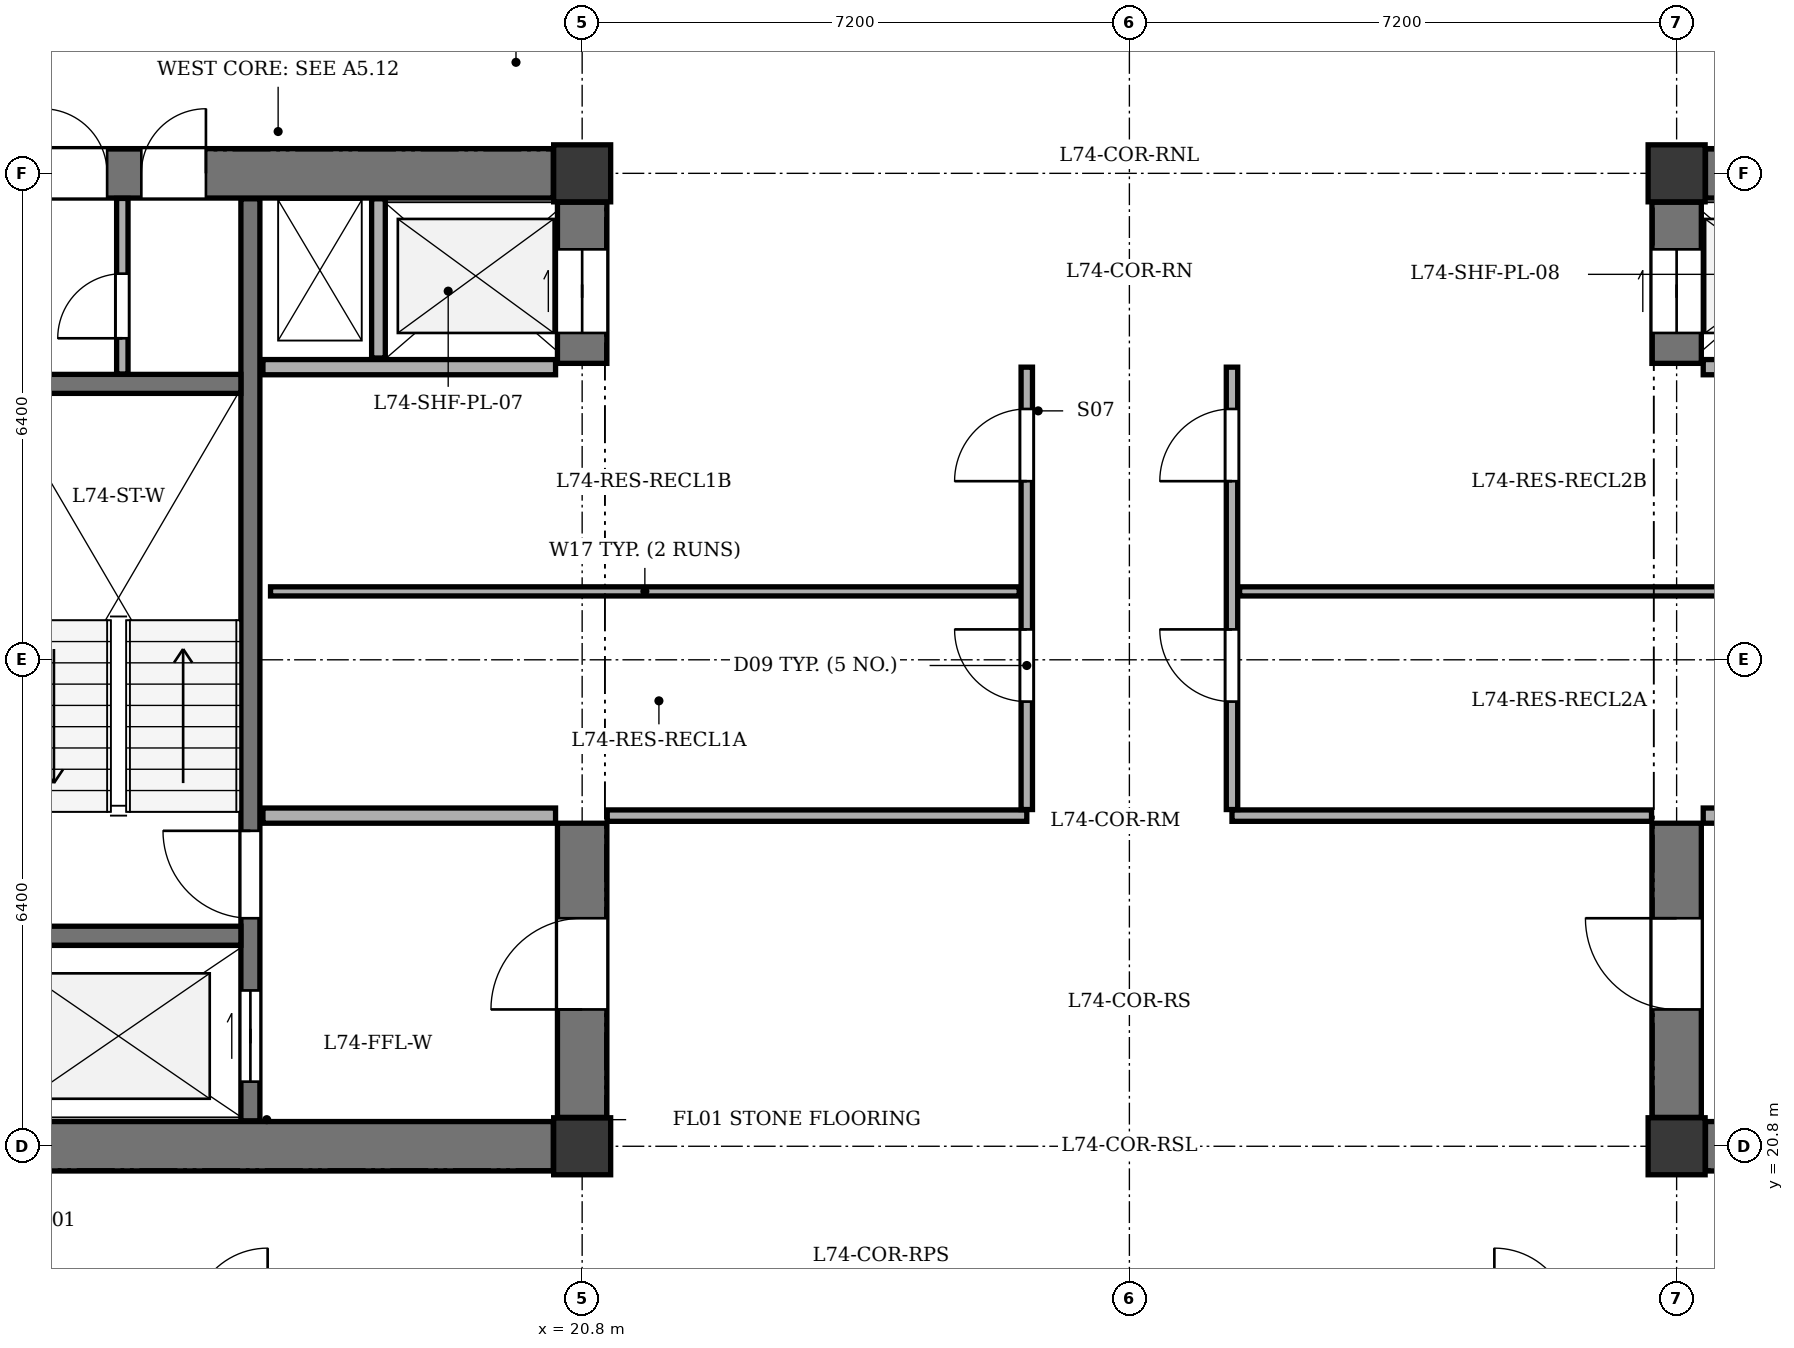
"""IFC4 building model, lengths in metres.
Left out: names, types, materials, properties, quantities, classifications, styles, units other than length and angle.
Written with IfcOpenShell. Run it as: python <this file> out.ifc"""

import sys

from ifc_helpers import new_model, si_unit, direction, frame, frame_2d, origin, origin_2d, place, context, subcontext, project, spatial, rectangle, extrude, element, fill, save


model = new_model("IFC4")
c1 = context("Model", 3, precision=1e-05, world=origin(), true_north=direction((0.0, 1.0)))
c2 = subcontext(c1, "Body", "Model", "MODEL_VIEW")
j1 = project(units=[si_unit("LENGTHUNIT", "METRE"), si_unit("PLANEANGLEUNIT", "RADIAN")], contexts=[c1])
p1 = place(None, origin())
s1 = spatial("IfcSite", under=j1, at=p1, CompositionType="ELEMENT")
p2 = place(p1, origin())
s2 = spatial("IfcBuilding", under=s1, at=p2, CompositionType="ELEMENT")
p3 = place(p2, frame((0.0, 0.0, 278.9)))
s3 = spatial("IfcBuildingStorey", under=s2, at=p3, CompositionType="ELEMENT", Elevation=278.9)
for number, where, z_axis, x_axis in (
    (1, (20.8, 20.8, 0.0), (0.0, 0.0, 1.0), (1.0, 0.0, 0.0)),
    (2, (20.8, 33.6, 0.0), (0.0, 0.0, 1.0), (1.0, 0.0, 0.0)),
    (3, (35.2, 20.8, 0.0), (0.0, 0.0, 1.0), (1.0, 0.0, 0.0)),
    (4, (35.2, 33.6, 0.0), (0.0, 0.0, 1.0), (1.0, 0.0, 0.0)),
):
    element("IfcColumn", number, at=place(p3, frame(where, z_axis=z_axis, x_axis=x_axis)), inside=s3, PredefinedType="COLUMN", context=c2, shape_type="SweptSolid", body=[
        extrude(rectangle(XDim=0.75, YDim=0.75, at=origin_2d()), origin(), (0.0, 0.0, 1.0), 3.4),
    ])
p4 = place(p3, frame((13.18, 20.8, 0.0), z_axis=(0.0, 0.0, 1.0), x_axis=(1.0, 0.0, 0.0)))
e5 = element("IfcWall", 5, at=p4, inside=s3, PredefinedType="SHEAR", context=c2, shape_type="SweptSolid", body=[
    extrude(rectangle(XDim=7.24, YDim=0.65, at=frame_2d((3.62, 0.0))), origin(), (0.0, 0.0, 1.0), 2.95),
])
p5 = place(p3, frame((13.18, 33.6, 0.0), z_axis=(0.0, 0.0, 1.0), x_axis=(1.0, 0.0, 0.0)))
e6 = element("IfcWall", 6, at=p5, inside=s3, PredefinedType="SHEAR", context=c2, shape_type="SweptSolid", body=[
    extrude(rectangle(XDim=7.24, YDim=0.65, at=frame_2d((3.62, 0.0))), origin(), (0.0, 0.0, 1.0), 2.95),
])
p6 = place(p5, frame((0.52, 0.0, 0.0)))
e7 = element("IfcOpeningElement", 7, at=p6, cuts=e6, PredefinedType="OPENING", context=c2, shape_type="SweptSolid", body=[
    extrude(rectangle(XDim=0.85, YDim=2.02, at=frame_2d((0.425, 1.01))), frame((0.0, 0.335, 0.0), z_axis=(0.0, -1.0, 0.0), x_axis=(1.0, 0.0, 0.0)), (0.0, 0.0, 1.0), 0.67),
])
p7 = place(p5, frame((1.82, 0.0, 0.0)))
e8 = element("IfcOpeningElement", 8, at=p7, cuts=e6, PredefinedType="OPENING", context=c2, shape_type="SweptSolid", body=[
    extrude(rectangle(XDim=0.85, YDim=2.02, at=frame_2d((0.425, 1.01))), frame((0.0, 0.335, 0.0), z_axis=(0.0, -1.0, 0.0), x_axis=(1.0, 0.0, 0.0)), (0.0, 0.0, 1.0), 0.67),
])
p8 = place(p3, frame((20.8, 21.18, 0.0), z_axis=(0.0, 0.0, 1.0), x_axis=(0.0, 1.0, 0.0)))
e9 = element("IfcWall", 9, at=p8, inside=s3, PredefinedType="SHEAR", context=c2, shape_type="SweptSolid", body=[
    extrude(rectangle(XDim=3.87, YDim=0.65, at=frame_2d((1.935, 0.0))), origin(), (0.0, 0.0, 1.0), 2.95),
])
p9 = place(p8, frame((1.42, 0.0, 0.0)))
e10 = element("IfcOpeningElement", 10, at=p9, cuts=e9, PredefinedType="OPENING", context=c2, shape_type="SweptSolid", body=[
    extrude(rectangle(XDim=1.2, YDim=2.15, at=frame_2d((0.6, 1.075))), frame((0.0, 0.335, 0.0), z_axis=(0.0, -1.0, 0.0), x_axis=(1.0, 0.0, 0.0)), (0.0, 0.0, 1.0), 0.67),
])
p10 = place(p3, frame((20.8, 31.1, 0.0), z_axis=(0.0, 0.0, 1.0), x_axis=(0.0, 1.0, 0.0)))
e11 = element("IfcWall", 11, at=p10, inside=s3, PredefinedType="SHEAR", context=c2, shape_type="SweptSolid", body=[
    extrude(rectangle(XDim=2.12, YDim=0.65, at=frame_2d((1.06, 0.0))), origin(), (0.0, 0.0, 1.0), 2.95),
])
p11 = place(p10, frame((0.4, 0.0, 0.0)))
e12 = element("IfcOpeningElement", 12, at=p11, cuts=e11, PredefinedType="OPENING", context=c2, shape_type="SweptSolid", body=[
    extrude(rectangle(XDim=1.1, YDim=2.1, at=frame_2d((0.55, 1.05))), frame((0.0, 0.335, 0.0), z_axis=(0.0, -1.0, 0.0), x_axis=(1.0, 0.0, 0.0)), (0.0, 0.0, 1.0), 0.67),
])
p12 = place(p3, frame((16.435, 21.135, 0.0), z_axis=(0.0, 0.0, 1.0), x_axis=(0.0, 1.0, 0.0)))
e13 = element("IfcWall", 13, at=p12, inside=s3, PredefinedType="SHEAR", context=c2, shape_type="SweptSolid", body=[
    extrude(rectangle(XDim=12.13, YDim=0.25, at=frame_2d((6.065, 0.0))), origin(), (0.0, 0.0, 1.0), 2.95),
])
p13 = place(p12, frame((0.515, 0.0, 0.0)))
e14 = element("IfcOpeningElement", 14, at=p13, cuts=e13, PredefinedType="OPENING", context=c2, shape_type="SweptSolid", body=[
    extrude(rectangle(XDim=1.2, YDim=2.15, at=frame_2d((0.6, 1.075))), frame((0.0, 0.135, 0.0), z_axis=(0.0, -1.0, 0.0), x_axis=(1.0, 0.0, 0.0)), (0.0, 0.0, 1.0), 0.27),
])
p14 = place(p12, frame((2.665, 0.0, 0.0)))
e15 = element("IfcOpeningElement", 15, at=p14, cuts=e13, PredefinedType="OPENING", context=c2, shape_type="SweptSolid", body=[
    extrude(rectangle(XDim=1.15, YDim=2.15, at=frame_2d((0.575, 1.075))), frame((0.0, 0.135, 0.0), z_axis=(0.0, -1.0, 0.0), x_axis=(1.0, 0.0, 0.0)), (0.0, 0.0, 1.0), 0.27),
])
for number, where, z_axis, x_axis in (
    (16, (13.135, 23.57, 0.0), (0.0, 0.0, 1.0), (1.0, 0.0, 0.0)),
    (17, (13.135, 30.83, 0.0), (0.0, 0.0, 1.0), (1.0, 0.0, 0.0)),
):
    element("IfcWall", number, at=place(p3, frame(where, z_axis=z_axis, x_axis=x_axis)), inside=s3, PredefinedType="SHEAR", context=c2, shape_type="SweptSolid", body=[
        extrude(rectangle(XDim=3.175, YDim=0.25, at=frame_2d((1.587, 0.0))), origin(), (0.0, 0.0, 1.0), 2.95),
    ])
for number, where, z_axis, x_axis in (
    (18, (16.6, 25.15, 0.0), (0.0, 0.0, 1.0), (1.0, 0.0, 0.0)),
    (19, (16.6, 31.05, 0.0), (0.0, 0.0, 1.0), (1.0, 0.0, 0.0)),
):
    element("IfcWall", number, at=place(p3, frame(where, z_axis=z_axis, x_axis=x_axis)), inside=s3, PredefinedType="SOLIDWALL", context=c2, shape_type="SweptSolid", body=[
        extrude(rectangle(XDim=3.85, YDim=0.2, at=frame_2d((1.925, 0.0))), origin(), (0.0, 0.0, 1.0), 2.95),
    ])
p15 = place(p3, frame((18.12, 31.17, 0.0), z_axis=(0.0, 0.0, 1.0), x_axis=(0.0, 1.0, 0.0)))
e20 = element("IfcWall", 20, at=p15, inside=s3, PredefinedType="PARTITIONING", context=c2, shape_type="SweptSolid", body=[
    extrude(rectangle(XDim=2.095, YDim=0.18, at=frame_2d((1.047, 0.0))), origin(), (0.0, 0.0, 1.0), 2.95),
])
p16 = place(p3, frame((35.58, 20.8, 0.0), z_axis=(0.0, 0.0, 1.0), x_axis=(1.0, 0.0, 0.0)))
e21 = element("IfcWall", 21, at=p16, inside=s3, PredefinedType="SHEAR", context=c2, shape_type="SweptSolid", body=[
    extrude(rectangle(XDim=7.24, YDim=0.65, at=frame_2d((3.62, 0.0))), origin(), (0.0, 0.0, 1.0), 2.95),
])
p17 = place(p3, frame((35.58, 33.6, 0.0), z_axis=(0.0, 0.0, 1.0), x_axis=(1.0, 0.0, 0.0)))
e22 = element("IfcWall", 22, at=p17, inside=s3, PredefinedType="SHEAR", context=c2, shape_type="SweptSolid", body=[
    extrude(rectangle(XDim=7.24, YDim=0.65, at=frame_2d((3.62, 0.0))), origin(), (0.0, 0.0, 1.0), 2.95),
])
p18 = place(p17, frame((4.82, 0.0, 0.0)))
e23 = element("IfcOpeningElement", 23, at=p18, cuts=e22, PredefinedType="OPENING", context=c2, shape_type="SweptSolid", body=[
    extrude(rectangle(XDim=1.3, YDim=2.15, at=frame_2d((0.65, 1.075))), frame((0.0, 0.335, 0.0), z_axis=(0.0, -1.0, 0.0), x_axis=(1.0, 0.0, 0.0)), (0.0, 0.0, 1.0), 0.67),
])
p19 = place(p17, frame((2.62, 0.0, 0.0)))
e24 = element("IfcOpeningElement", 24, at=p19, cuts=e22, PredefinedType="OPENING", context=c2, shape_type="SweptSolid", body=[
    extrude(rectangle(XDim=0.85, YDim=2.02, at=frame_2d((0.425, 1.01))), frame((0.0, 0.335, 0.0), z_axis=(0.0, -1.0, 0.0), x_axis=(1.0, 0.0, 0.0)), (0.0, 0.0, 1.0), 0.67),
])
p20 = place(p3, frame((35.2, 21.18, 0.0), z_axis=(0.0, 0.0, 1.0), x_axis=(0.0, 1.0, 0.0)))
e25 = element("IfcWall", 25, at=p20, inside=s3, PredefinedType="SHEAR", context=c2, shape_type="SweptSolid", body=[
    extrude(rectangle(XDim=3.87, YDim=0.65, at=frame_2d((1.935, 0.0))), origin(), (0.0, 0.0, 1.0), 2.95),
])
p21 = place(p20, frame((1.42, 0.0, 0.0)))
e26 = element("IfcOpeningElement", 26, at=p21, cuts=e25, PredefinedType="OPENING", context=c2, shape_type="SweptSolid", body=[
    extrude(rectangle(XDim=1.2, YDim=2.15, at=frame_2d((0.6, 1.075))), frame((0.0, 0.335, 0.0), z_axis=(0.0, -1.0, 0.0), x_axis=(1.0, 0.0, 0.0)), (0.0, 0.0, 1.0), 0.67),
])
p22 = place(p3, frame((35.2, 31.1, 0.0), z_axis=(0.0, 0.0, 1.0), x_axis=(0.0, 1.0, 0.0)))
e27 = element("IfcWall", 27, at=p22, inside=s3, PredefinedType="SHEAR", context=c2, shape_type="SweptSolid", body=[
    extrude(rectangle(XDim=2.12, YDim=0.65, at=frame_2d((1.06, 0.0))), origin(), (0.0, 0.0, 1.0), 2.95),
])
p23 = place(p22, frame((0.4, 0.0, 0.0)))
e28 = element("IfcOpeningElement", 28, at=p23, cuts=e27, PredefinedType="OPENING", context=c2, shape_type="SweptSolid", body=[
    extrude(rectangle(XDim=1.1, YDim=2.1, at=frame_2d((0.55, 1.05))), frame((0.0, 0.335, 0.0), z_axis=(0.0, -1.0, 0.0), x_axis=(1.0, 0.0, 0.0)), (0.0, 0.0, 1.0), 0.67),
])
p24 = place(p3, frame((35.55, 25.15, 0.0), z_axis=(0.0, 0.0, 1.0), x_axis=(1.0, 0.0, 0.0)))
e29 = element("IfcWall", 29, at=p24, inside=s3, PredefinedType="SOLIDWALL", context=c2, shape_type="SweptSolid", body=[
    extrude(rectangle(XDim=3.85, YDim=0.2, at=frame_2d((1.925, 0.0))), origin(), (0.0, 0.0, 1.0), 2.95),
])
p25 = place(p3, frame((35.55, 31.05, 0.0), z_axis=(0.0, 0.0, 1.0), x_axis=(1.0, 0.0, 0.0)))
e30 = element("IfcWall", 30, at=p25, inside=s3, PredefinedType="SOLIDWALL", context=c2, shape_type="SweptSolid", body=[
    extrude(rectangle(XDim=2.25, YDim=0.2, at=frame_2d((1.125, 0.0))), origin(), (0.0, 0.0, 1.0), 2.95),
])
p26 = place(p3, frame((14.75, 30.96, 0.0), z_axis=(0.0, 0.0, 1.0), x_axis=(0.0, 1.0, 0.0)))
e31 = element("IfcWall", 31, at=p26, inside=s3, PredefinedType="PARTITIONING", context=c2, shape_type="SweptSolid", body=[
    extrude(rectangle(XDim=2.31, YDim=0.15, at=frame_2d((1.155, 0.0))), origin(), (0.0, 0.0, 1.0), 2.95),
])
p27 = place(p26, frame((0.47, 0.0, 0.0)))
e32 = element("IfcOpeningElement", 32, at=p27, cuts=e31, PredefinedType="OPENING", context=c2, shape_type="SweptSolid", body=[
    extrude(rectangle(XDim=0.85, YDim=2.02, at=frame_2d((0.425, 1.01))), frame((0.0, 0.085, 0.0), z_axis=(0.0, -1.0, 0.0), x_axis=(1.0, 0.0, 0.0)), (0.0, 0.0, 1.0), 0.17),
])
for number, where, z_axis, x_axis in (
    (33, (21.13, 25.15, 0.0), (0.0, 0.0, 1.0), (1.0, 0.0, 0.0)),
    (34, (29.35, 25.15, 0.0), (0.0, 0.0, 1.0), (1.0, 0.0, 0.0)),
):
    element("IfcWall", number, at=place(p3, frame(where, z_axis=z_axis, x_axis=x_axis)), inside=s3, PredefinedType="PARTITIONING", context=c2, shape_type="SweptSolid", body=[
        extrude(rectangle(XDim=5.52, YDim=0.15, at=frame_2d((2.76, 0.0))), origin(), (0.0, 0.0, 1.0), 2.95),
    ])
p28 = place(p3, frame((26.65, 25.23, 0.0), z_axis=(0.0, 0.0, 1.0), x_axis=(0.0, 1.0, 0.0)))
e35 = element("IfcWall", 35, at=p28, inside=s3, PredefinedType="PARTITIONING", context=c2, shape_type="SweptSolid", body=[
    extrude(rectangle(XDim=5.82, YDim=0.15, at=frame_2d((2.91, 0.0))), origin(), (0.0, 0.0, 1.0), 2.95),
])
p29 = place(p28, frame((1.42, 0.0, 0.0)))
e36 = element("IfcOpeningElement", 36, at=p29, cuts=e35, PredefinedType="OPENING", context=c2, shape_type="SweptSolid", body=[
    extrude(rectangle(XDim=0.95, YDim=2.1, at=frame_2d((0.475, 1.05))), frame((0.0, 0.085, 0.0), z_axis=(0.0, -1.0, 0.0), x_axis=(1.0, 0.0, 0.0)), (0.0, 0.0, 1.0), 0.17),
])
p30 = place(p28, frame((4.32, 0.0, 0.0)))
e37 = element("IfcOpeningElement", 37, at=p30, cuts=e35, PredefinedType="OPENING", context=c2, shape_type="SweptSolid", body=[
    extrude(rectangle(XDim=0.95, YDim=2.1, at=frame_2d((0.475, 1.05))), frame((0.0, 0.085, 0.0), z_axis=(0.0, -1.0, 0.0), x_axis=(1.0, 0.0, 0.0)), (0.0, 0.0, 1.0), 0.17),
])
p31 = place(p3, frame((16.7, 28.1, 0.0), z_axis=(0.0, 0.0, 1.0), x_axis=(1.0, 0.0, 0.0)))
e38 = element("IfcWall", 38, at=p31, inside=s3, PredefinedType="PARTITIONING", context=c2, shape_type="SweptSolid", body=[
    extrude(rectangle(XDim=9.85, YDim=0.12, at=frame_2d((4.925, 0.0))), origin(), (0.0, 0.0, 1.0), 2.95),
])
p32 = place(p3, frame((29.35, 25.23, 0.0), z_axis=(0.0, 0.0, 1.0), x_axis=(0.0, 1.0, 0.0)))
e39 = element("IfcWall", 39, at=p32, inside=s3, PredefinedType="PARTITIONING", context=c2, shape_type="SweptSolid", body=[
    extrude(rectangle(XDim=5.82, YDim=0.15, at=frame_2d((2.91, 0.0))), origin(), (0.0, 0.0, 1.0), 2.95),
])
p33 = place(p32, frame((1.42, 0.0, 0.0)))
e40 = element("IfcOpeningElement", 40, at=p33, cuts=e39, PredefinedType="OPENING", context=c2, shape_type="SweptSolid", body=[
    extrude(rectangle(XDim=0.95, YDim=2.1, at=frame_2d((0.475, 1.05))), frame((0.0, 0.085, 0.0), z_axis=(0.0, -1.0, 0.0), x_axis=(1.0, 0.0, 0.0)), (0.0, 0.0, 1.0), 0.17),
])
p34 = place(p32, frame((4.32, 0.0, 0.0)))
e41 = element("IfcOpeningElement", 41, at=p34, cuts=e39, PredefinedType="OPENING", context=c2, shape_type="SweptSolid", body=[
    extrude(rectangle(XDim=0.95, YDim=2.1, at=frame_2d((0.475, 1.05))), frame((0.0, 0.085, 0.0), z_axis=(0.0, -1.0, 0.0), x_axis=(1.0, 0.0, 0.0)), (0.0, 0.0, 1.0), 0.17),
])
p35 = place(p3, frame((29.45, 28.1, 0.0), z_axis=(0.0, 0.0, 1.0), x_axis=(1.0, 0.0, 0.0)))
e42 = element("IfcWall", 42, at=p35, inside=s3, PredefinedType="PARTITIONING", context=c2, shape_type="SweptSolid", body=[
    extrude(rectangle(XDim=8.345, YDim=0.12, at=frame_2d((4.172, 0.0))), origin(), (0.0, 0.0, 1.0), 2.95),
])
p36 = place(p6, origin())
e43 = element("IfcDoor", 43, at=p36, inside=s3, OperationType="SINGLE_SWING_LEFT", PredefinedType="DOOR", context=c2, shape_type="SweptSolid", body=[
    extrude(rectangle(XDim=0.85, YDim=2.02, at=frame_2d((0.425, 1.01))), frame((0.0, 0.025, 0.0), z_axis=(0.0, -1.0, 0.0), x_axis=(1.0, 0.0, 0.0)), (0.0, 0.0, 1.0), 0.05),
])
fill(e7, e43)
p37 = place(p7, origin())
e44 = element("IfcDoor", 44, at=p37, inside=s3, OperationType="SINGLE_SWING_RIGHT", PredefinedType="DOOR", context=c2, shape_type="SweptSolid", body=[
    extrude(rectangle(XDim=0.85, YDim=2.02, at=frame_2d((0.425, 1.01))), frame((0.0, 0.025, 0.0), z_axis=(0.0, -1.0, 0.0), x_axis=(1.0, 0.0, 0.0)), (0.0, 0.0, 1.0), 0.05),
])
fill(e8, e44)
p38 = place(p9, origin())
e45 = element("IfcDoor", 45, at=p38, inside=s3, OperationType="SINGLE_SWING_LEFT", PredefinedType="DOOR", context=c2, shape_type="SweptSolid", body=[
    extrude(rectangle(XDim=1.2, YDim=2.15, at=frame_2d((0.6, 1.075))), frame((0.0, 0.025, 0.0), z_axis=(0.0, -1.0, 0.0), x_axis=(1.0, 0.0, 0.0)), (0.0, 0.0, 1.0), 0.05),
])
fill(e10, e45)
p39 = place(p11, origin())
e46 = element("IfcDoor", 46, at=p39, inside=s3, OperationType="DOUBLE_DOOR_SLIDING", PredefinedType="DOOR", context=c2, shape_type="SweptSolid", body=[
    extrude(rectangle(XDim=1.1, YDim=2.1, at=frame_2d((0.55, 1.05))), frame((0.0, 0.025, 0.0), z_axis=(0.0, -1.0, 0.0), x_axis=(1.0, 0.0, 0.0)), (0.0, 0.0, 1.0), 0.05),
])
fill(e12, e46)
p40 = place(p13, origin())
e47 = element("IfcDoor", 47, at=p40, inside=s3, OperationType="DOUBLE_DOOR_SLIDING", PredefinedType="DOOR", context=c2, shape_type="SweptSolid", body=[
    extrude(rectangle(XDim=1.2, YDim=2.15, at=frame_2d((0.6, 1.075))), frame((0.0, 0.025, 0.0), z_axis=(0.0, -1.0, 0.0), x_axis=(1.0, 0.0, 0.0)), (0.0, 0.0, 1.0), 0.05),
])
fill(e14, e47)
p41 = place(p14, origin())
e48 = element("IfcDoor", 48, at=p41, inside=s3, OperationType="SINGLE_SWING_RIGHT", PredefinedType="DOOR", context=c2, shape_type="SweptSolid", body=[
    extrude(rectangle(XDim=1.15, YDim=2.15, at=frame_2d((0.575, 1.075))), frame((0.0, 0.025, 0.0), z_axis=(0.0, -1.0, 0.0), x_axis=(1.0, 0.0, 0.0)), (0.0, 0.0, 1.0), 0.05),
])
fill(e15, e48)
p42 = place(p21, origin())
e49 = element("IfcDoor", 49, at=p42, inside=s3, OperationType="SINGLE_SWING_RIGHT", PredefinedType="DOOR", context=c2, shape_type="SweptSolid", body=[
    extrude(rectangle(XDim=1.2, YDim=2.15, at=frame_2d((0.6, 1.075))), frame((0.0, 0.025, 0.0), z_axis=(0.0, -1.0, 0.0), x_axis=(1.0, 0.0, 0.0)), (0.0, 0.0, 1.0), 0.05),
])
fill(e26, e49)
p43 = place(p23, origin())
e50 = element("IfcDoor", 50, at=p43, inside=s3, OperationType="DOUBLE_DOOR_SLIDING", PredefinedType="DOOR", context=c2, shape_type="SweptSolid", body=[
    extrude(rectangle(XDim=1.1, YDim=2.1, at=frame_2d((0.55, 1.05))), frame((0.0, 0.025, 0.0), z_axis=(0.0, -1.0, 0.0), x_axis=(1.0, 0.0, 0.0)), (0.0, 0.0, 1.0), 0.05),
])
fill(e28, e50)
p44 = place(p27, origin())
e51 = element("IfcDoor", 51, at=p44, inside=s3, OperationType="SINGLE_SWING_LEFT", PredefinedType="DOOR", context=c2, shape_type="SweptSolid", body=[
    extrude(rectangle(XDim=0.85, YDim=2.02, at=frame_2d((0.425, 1.01))), frame((0.0, 0.025, 0.0), z_axis=(0.0, -1.0, 0.0), x_axis=(1.0, 0.0, 0.0)), (0.0, 0.0, 1.0), 0.05),
])
fill(e32, e51)
p45 = place(p29, origin())
e52 = element("IfcDoor", 52, at=p45, inside=s3, OperationType="SINGLE_SWING_RIGHT", PredefinedType="DOOR", context=c2, shape_type="SweptSolid", body=[
    extrude(rectangle(XDim=0.95, YDim=2.1, at=frame_2d((0.475, 1.05))), frame((0.0, 0.025, 0.0), z_axis=(0.0, -1.0, 0.0), x_axis=(1.0, 0.0, 0.0)), (0.0, 0.0, 1.0), 0.05),
])
fill(e36, e52)
p46 = place(p30, origin())
e53 = element("IfcDoor", 53, at=p46, inside=s3, OperationType="SINGLE_SWING_LEFT", PredefinedType="DOOR", context=c2, shape_type="SweptSolid", body=[
    extrude(rectangle(XDim=0.95, YDim=2.1, at=frame_2d((0.475, 1.05))), frame((0.0, 0.025, 0.0), z_axis=(0.0, -1.0, 0.0), x_axis=(1.0, 0.0, 0.0)), (0.0, 0.0, 1.0), 0.05),
])
fill(e37, e53)
p47 = place(p33, origin())
e54 = element("IfcDoor", 54, at=p47, inside=s3, OperationType="SINGLE_SWING_RIGHT", PredefinedType="DOOR", context=c2, shape_type="SweptSolid", body=[
    extrude(rectangle(XDim=0.95, YDim=2.1, at=frame_2d((0.475, 1.05))), frame((0.0, 0.025, 0.0), z_axis=(0.0, -1.0, 0.0), x_axis=(1.0, 0.0, 0.0)), (0.0, 0.0, 1.0), 0.05),
])
fill(e40, e54)
p48 = place(p34, origin())
e55 = element("IfcDoor", 55, at=p48, inside=s3, OperationType="SINGLE_SWING_LEFT", PredefinedType="DOOR", context=c2, shape_type="SweptSolid", body=[
    extrude(rectangle(XDim=0.95, YDim=2.1, at=frame_2d((0.475, 1.05))), frame((0.0, 0.025, 0.0), z_axis=(0.0, -1.0, 0.0), x_axis=(1.0, 0.0, 0.0)), (0.0, 0.0, 1.0), 0.05),
])
fill(e41, e55)
save(model, sys.argv[1])
